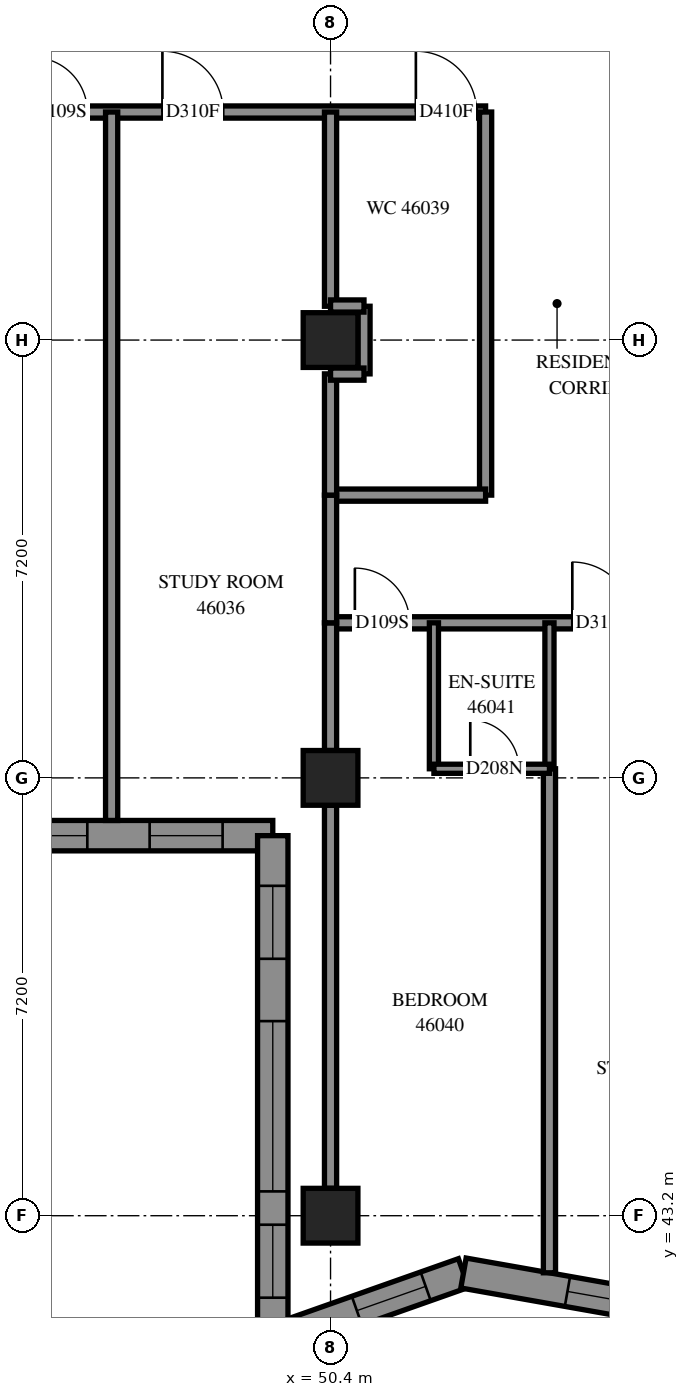
"""IFC4 building model, lengths in metres.
Left out: names, types, materials, properties, quantities, classifications, styles, units other than length and angle.
Written with IfcOpenShell. Run it as: python <this file> out.ifc"""

import sys

from ifc_helpers import new_model, si_unit, direction, frame, frame_2d, origin, origin_2d, place, context, subcontext, project, spatial, polyline, rectangle, outline, extrude, element, fill, save


model = new_model("IFC4")
c1 = context("Model", 3, precision=1e-05, world=origin(), true_north=direction((0.0, 1.0)))
c2 = subcontext(c1, "Body", "Model", "MODEL_VIEW")
j1 = project(units=[si_unit("LENGTHUNIT", "METRE"), si_unit("PLANEANGLEUNIT", "RADIAN")], contexts=[c1])
p1 = place(None, origin())
s1 = spatial("IfcSite", under=j1, at=p1, CompositionType="ELEMENT")
p2 = place(p1, origin())
s2 = spatial("IfcBuilding", under=s1, at=p2, CompositionType="ELEMENT")
p3 = place(p2, frame((0.0, 0.0, 169.4)))
s3 = spatial("IfcBuildingStorey", under=s2, at=p3, CompositionType="ELEMENT", Elevation=169.4)
for number, where, z_axis, x_axis in (
    (1, (50.4, 43.2, 0.0), (0.0, 0.0, 1.0), (1.0, 0.0, 0.0)),
    (2, (50.4, 50.4, 0.0), (0.0, 0.0, 1.0), (1.0, 0.0, 0.0)),
    (3, (50.4, 57.6, 0.0), (0.0, 0.0, 1.0), (1.0, 0.0, 0.0)),
):
    element("IfcColumn", number, at=place(p3, frame(where, z_axis=z_axis, x_axis=x_axis)), inside=s3, PredefinedType="COLUMN", context=c2, shape_type="SweptSolid", body=[
        extrude(rectangle(XDim=0.9, YDim=0.9, at=origin_2d()), origin(), (0.0, 0.0, 1.0), 3.1),
    ])
p4 = place(p3, frame((42.25, 49.45, 0.0), z_axis=(0.0, 0.0, 1.0), x_axis=(1.0, 0.0, 0.0)))
e4 = element("IfcWall", 4, at=p4, inside=s3, PredefinedType="SOLIDWALL", context=c2, shape_type="SweptSolid", body=[
    extrude(outline(polyline([(-0.25, -0.25), (6.95, -0.25), (7.45, 0.25), (0.25, 0.25), (-0.25, -0.25)])), origin(), (0.0, 0.0, 1.0), 3.1),
])
p5 = place(p4, frame((1.35, 0.0, 0.45)))
e5 = element("IfcOpeningElement", 5, at=p5, cuts=e4, PredefinedType="OPENING", context=c2, shape_type="SweptSolid", body=[
    extrude(rectangle(XDim=2.8, YDim=2.5, at=frame_2d((1.4, 1.25))), frame((0.0, 0.26, 0.0), z_axis=(0.0, -1.0, 0.0), x_axis=(1.0, 0.0, 0.0)), (0.0, 0.0, 1.0), 0.52),
])
p6 = place(p4, frame((5.175, 0.0, 0.45)))
e6 = element("IfcOpeningElement", 6, at=p6, cuts=e4, PredefinedType="OPENING", context=c2, shape_type="SweptSolid", body=[
    extrude(rectangle(XDim=1.2, YDim=2.5, at=frame_2d((0.6, 1.25))), frame((0.0, 0.26, 0.0), z_axis=(0.0, -1.0, 0.0), x_axis=(1.0, 0.0, 0.0)), (0.0, 0.0, 1.0), 0.52),
])
p7 = place(p3, frame((49.45, 49.45, 0.0), z_axis=(0.0, 0.0, 1.0), x_axis=(0.0, -1.0, 0.0)))
e7 = element("IfcWall", 7, at=p7, inside=s3, PredefinedType="SOLIDWALL", context=c2, shape_type="SweptSolid", body=[
    extrude(outline(polyline([(0.25, -0.25), (8.653, -0.25), (7.946, 0.25), (-0.25, 0.25), (0.25, -0.25)])), origin(), (0.0, 0.0, 1.0), 3.1),
])
p8 = place(p7, frame((3.05, 0.0, 0.45)))
e8 = element("IfcOpeningElement", 8, at=p8, cuts=e7, PredefinedType="OPENING", context=c2, shape_type="SweptSolid", body=[
    extrude(rectangle(XDim=2.8, YDim=2.5, at=frame_2d((1.4, 1.25))), frame((0.0, 0.26, 0.0), z_axis=(0.0, -1.0, 0.0), x_axis=(1.0, 0.0, 0.0)), (0.0, 0.0, 1.0), 0.52),
])
p9 = place(p7, frame((0.825, 0.0, 0.45)))
e9 = element("IfcOpeningElement", 9, at=p9, cuts=e7, PredefinedType="OPENING", context=c2, shape_type="SweptSolid", body=[
    extrude(rectangle(XDim=1.2, YDim=2.5, at=frame_2d((0.6, 1.25))), frame((0.0, 0.26, 0.0), z_axis=(0.0, -1.0, 0.0), x_axis=(1.0, 0.0, 0.0)), (0.0, 0.0, 1.0), 0.52),
])
p10 = place(p7, frame((6.398, 0.0, 0.45)))
e10 = element("IfcOpeningElement", 10, at=p10, cuts=e7, PredefinedType="OPENING", context=c2, shape_type="SweptSolid", body=[
    extrude(rectangle(XDim=1.2, YDim=2.5, at=frame_2d((0.6, 1.25))), frame((0.0, 0.26, 0.0), z_axis=(0.0, -1.0, 0.0), x_axis=(1.0, 0.0, 0.0)), (0.0, 0.0, 1.0), 0.52),
])
p11 = place(p3, frame((49.45, 41.15, 0.0), z_axis=(0.0, 0.0, 1.0), x_axis=(0.9429548009, 0.3329207766, 0.0)))
e11 = element("IfcWall", 11, at=p11, inside=s3, PredefinedType="SOLIDWALL", context=c2, shape_type="SweptSolid", body=[
    extrude(outline(polyline([(-0.353, -0.25), (3.26, -0.25), (3.392, 0.25), (0.353, 0.25), (-0.353, -0.25)])), origin(), (0.0, 0.0, 1.0), 3.1),
])
p12 = place(p11, frame((1.467, 0.0, 0.45)))
e12 = element("IfcOpeningElement", 12, at=p12, cuts=e11, PredefinedType="OPENING", context=c2, shape_type="SweptSolid", body=[
    extrude(rectangle(XDim=1.2, YDim=2.5, at=frame_2d((0.6, 1.25))), frame((0.0, 0.26, 0.0), z_axis=(0.0, -1.0, 0.0), x_axis=(1.0, 0.0, 0.0)), (0.0, 0.0, 1.0), 0.52),
])
p13 = place(p3, frame((52.586, 42.258, 0.0), z_axis=(0.0, 0.0, 1.0), x_axis=(0.9847004616, -0.1742555624, 0.0)))
e13 = element("IfcWall", 13, at=p13, inside=s3, PredefinedType="SOLIDWALL", context=c2, shape_type="SweptSolid", body=[
    extrude(outline(polyline([(0.066, -0.25), (3.526, -0.25), (3.437, 0.25), (-0.066, 0.25), (0.066, -0.25)])), origin(), (0.0, 0.0, 1.0), 3.1),
])
p14 = place(p13, frame((1.737, 0.0, 0.45)))
e14 = element("IfcOpeningElement", 14, at=p14, cuts=e13, PredefinedType="OPENING", context=c2, shape_type="SweptSolid", body=[
    extrude(rectangle(XDim=1.2, YDim=2.5, at=frame_2d((0.6, 1.25))), frame((0.0, 0.26, 0.0), z_axis=(0.0, -1.0, 0.0), x_axis=(1.0, 0.0, 0.0)), (0.0, 0.0, 1.0), 0.52),
])
p15 = place(p3, frame((36.0, 61.35, 0.0), z_axis=(0.0, 0.0, 1.0), x_axis=(1.0, 0.0, 0.0)))
e15 = element("IfcWall", 15, at=p15, inside=s3, PredefinedType="PARTITIONING", context=c2, shape_type="SweptSolid", body=[
    extrude(rectangle(XDim=16.95, YDim=0.2, at=frame_2d((8.475, 0.0))), origin(), (0.0, 0.0, 1.0), 3.1),
])
p16 = place(p15, frame((2.3, 0.0, 0.0)))
e16 = element("IfcOpeningElement", 16, at=p16, cuts=e15, PredefinedType="OPENING", context=c2, shape_type="SweptSolid", body=[
    extrude(rectangle(XDim=0.9, YDim=2.1, at=frame_2d((0.45, 1.05))), frame((0.0, 0.11, 0.0), z_axis=(0.0, -1.0, 0.0), x_axis=(1.0, 0.0, 0.0)), (0.0, 0.0, 1.0), 0.22),
])
p17 = place(p15, frame((4.125, 0.0, 0.0)))
e17 = element("IfcOpeningElement", 17, at=p17, cuts=e15, PredefinedType="OPENING", context=c2, shape_type="SweptSolid", body=[
    extrude(rectangle(XDim=1.0, YDim=2.1, at=frame_2d((0.5, 1.05))), frame((0.0, 0.11, 0.0), z_axis=(0.0, -1.0, 0.0), x_axis=(1.0, 0.0, 0.0)), (0.0, 0.0, 1.0), 0.22),
])
p18 = place(p15, frame((9.5, 0.0, 0.0)))
e18 = element("IfcOpeningElement", 18, at=p18, cuts=e15, PredefinedType="OPENING", context=c2, shape_type="SweptSolid", body=[
    extrude(rectangle(XDim=0.9, YDim=2.1, at=frame_2d((0.45, 1.05))), frame((0.0, 0.11, 0.0), z_axis=(0.0, -1.0, 0.0), x_axis=(1.0, 0.0, 0.0)), (0.0, 0.0, 1.0), 0.22),
])
p19 = place(p15, frame((11.635, 0.0, 0.0)))
e19 = element("IfcOpeningElement", 19, at=p19, cuts=e15, PredefinedType="OPENING", context=c2, shape_type="SweptSolid", body=[
    extrude(rectangle(XDim=1.0, YDim=2.1, at=frame_2d((0.5, 1.05))), frame((0.0, 0.11, 0.0), z_axis=(0.0, -1.0, 0.0), x_axis=(1.0, 0.0, 0.0)), (0.0, 0.0, 1.0), 0.22),
])
p20 = place(p15, frame((15.803, 0.0, 0.0)))
e20 = element("IfcOpeningElement", 20, at=p20, cuts=e15, PredefinedType="OPENING", context=c2, shape_type="SweptSolid", body=[
    extrude(rectangle(XDim=1.0, YDim=2.1, at=frame_2d((0.5, 1.05))), frame((0.0, 0.11, 0.0), z_axis=(0.0, -1.0, 0.0), x_axis=(1.0, 0.0, 0.0)), (0.0, 0.0, 1.0), 0.22),
])
p21 = place(p3, frame((46.8, 49.7, 0.0), z_axis=(0.0, 0.0, 1.0), x_axis=(0.0, 1.0, 0.0)))
e21 = element("IfcWall", 21, at=p21, inside=s3, PredefinedType="PARTITIONING", context=c2, shape_type="SweptSolid", body=[
    extrude(rectangle(XDim=11.65, YDim=0.2, at=frame_2d((5.825, 0.0))), origin(), (0.0, 0.0, 1.0), 3.1),
])
p22 = place(p3, frame((54.0, 42.261, 0.0), z_axis=(0.0, 0.0, 1.0), x_axis=(0.0, 1.0, 0.0)))
e22 = element("IfcWall", 22, at=p22, inside=s3, PredefinedType="PARTITIONING", context=c2, shape_type="SweptSolid", body=[
    extrude(rectangle(XDim=8.289, YDim=0.2, at=frame_2d((4.144, 0.0))), origin(), (0.0, 0.0, 1.0), 3.1),
])
p23 = place(p3, frame((50.4, 43.65, 0.0), z_axis=(0.0, 0.0, 1.0), x_axis=(0.0, 1.0, 0.0)))
e23 = element("IfcWall", 23, at=p23, inside=s3, PredefinedType="PARTITIONING", context=c2, shape_type="SweptSolid", body=[
    extrude(rectangle(XDim=6.3, YDim=0.2, at=frame_2d((3.15, 0.0))), origin(), (0.0, 0.0, 1.0), 2.6),
])
p24 = place(p3, frame((52.95, 55.05, 0.0), z_axis=(0.0, 0.0, 1.0), x_axis=(0.0, 1.0, 0.0)))
e24 = element("IfcWall", 24, at=p24, inside=s3, PredefinedType="PARTITIONING", context=c2, shape_type="SweptSolid", body=[
    extrude(rectangle(XDim=6.3, YDim=0.2, at=frame_2d((3.15, 0.0))), origin(), (0.0, 0.0, 1.0), 3.1),
])
p25 = place(p3, frame((50.4, 52.95, 0.0), z_axis=(0.0, 0.0, 1.0), x_axis=(1.0, 0.0, 0.0)))
e25 = element("IfcWall", 25, at=p25, inside=s3, PredefinedType="PARTITIONING", context=c2, shape_type="SweptSolid", body=[
    extrude(rectangle(XDim=5.1, YDim=0.2, at=frame_2d((2.55, 0.0))), origin(), (0.0, 0.0, 1.0), 3.1),
])
p26 = place(p25, frame((0.4, 0.0, 0.0)))
e26 = element("IfcOpeningElement", 26, at=p26, cuts=e25, PredefinedType="OPENING", context=c2, shape_type="SweptSolid", body=[
    extrude(rectangle(XDim=0.9, YDim=2.1, at=frame_2d((0.45, 1.05))), frame((0.0, 0.11, 0.0), z_axis=(0.0, -1.0, 0.0), x_axis=(1.0, 0.0, 0.0)), (0.0, 0.0, 1.0), 0.22),
])
p27 = place(p25, frame((3.976, 0.0, 0.0)))
e27 = element("IfcOpeningElement", 27, at=p27, cuts=e25, PredefinedType="OPENING", context=c2, shape_type="SweptSolid", body=[
    extrude(rectangle(XDim=1.0, YDim=2.1, at=frame_2d((0.5, 1.05))), frame((0.0, 0.11, 0.0), z_axis=(0.0, -1.0, 0.0), x_axis=(1.0, 0.0, 0.0)), (0.0, 0.0, 1.0), 0.22),
])
p28 = place(p3, frame((50.4, 58.156, 0.0), z_axis=(0.0, 0.0, 1.0), x_axis=(0.0, 1.0, 0.0)))
e28 = element("IfcWall", 28, at=p28, inside=s3, PredefinedType="PARTITIONING", context=c2, shape_type="SweptSolid", body=[
    extrude(rectangle(XDim=3.194, YDim=0.2, at=frame_2d((1.597, 0.0))), origin(), (0.0, 0.0, 1.0), 3.1),
])
p29 = place(p3, frame((50.4, 55.05, 0.0), z_axis=(0.0, 0.0, 1.0), x_axis=(1.0, 0.0, 0.0)))
e29 = element("IfcWall", 29, at=p29, inside=s3, PredefinedType="PARTITIONING", context=c2, shape_type="SweptSolid", body=[
    extrude(rectangle(XDim=2.55, YDim=0.2, at=frame_2d((1.275, 0.0))), origin(), (0.0, 0.0, 1.0), 3.1),
])
for number, where, z_axis, x_axis in (
    (30, (52.1, 50.55, 0.0), (0.0, 0.0, 1.0), (0.0, 1.0, 0.0)),
    (31, (54.0, 50.55, 0.0), (0.0, 0.0, 1.0), (0.0, 1.0, 0.0)),
):
    element("IfcWall", number, at=place(p3, frame(where, z_axis=z_axis, x_axis=x_axis)), inside=s3, PredefinedType="PARTITIONING", context=c2, shape_type="SweptSolid", body=[
        extrude(rectangle(XDim=2.4, YDim=0.15, at=frame_2d((1.2, 0.0))), origin(), (0.0, 0.0, 1.0), 3.1),
    ])
for number, where, z_axis, x_axis in (
    (32, (50.4, 50.85, 0.0), (0.0, 0.0, 1.0), (0.0, 1.0, 0.0)),
    (33, (50.4, 52.95, 0.0), (0.0, 0.0, 1.0), (0.0, 1.0, 0.0)),
):
    element("IfcWall", number, at=place(p3, frame(where, z_axis=z_axis, x_axis=x_axis)), inside=s3, PredefinedType="PARTITIONING", context=c2, shape_type="SweptSolid", body=[
        extrude(rectangle(XDim=2.1, YDim=0.2, at=frame_2d((1.05, 0.0))), origin(), (0.0, 0.0, 1.0), 3.1),
    ])
p30 = place(p3, frame((50.4, 55.05, 0.0), z_axis=(0.0, 0.0, 1.0), x_axis=(0.0, 1.0, 0.0)))
e34 = element("IfcWall", 34, at=p30, inside=s3, PredefinedType="PARTITIONING", context=c2, shape_type="SweptSolid", body=[
    extrude(rectangle(XDim=1.994, YDim=0.2, at=frame_2d((0.997, 0.0))), origin(), (0.0, 0.0, 1.0), 3.1),
])
p31 = place(p3, frame((52.1, 50.55, 0.0), z_axis=(0.0, 0.0, 1.0), x_axis=(1.0, 0.0, 0.0)))
e35 = element("IfcWall", 35, at=p31, inside=s3, PredefinedType="PARTITIONING", context=c2, shape_type="SweptSolid", body=[
    extrude(rectangle(XDim=1.9, YDim=0.15, at=frame_2d((0.95, 0.0))), origin(), (0.0, 0.0, 1.0), 3.1),
])
p32 = place(p31, frame((0.598, 0.0, 0.0)))
e36 = element("IfcOpeningElement", 36, at=p32, cuts=e35, PredefinedType="OPENING", context=c2, shape_type="SweptSolid", body=[
    extrude(rectangle(XDim=0.8, YDim=2.1, at=frame_2d((0.4, 1.05))), frame((0.0, 0.085, 0.0), z_axis=(0.0, -1.0, 0.0), x_axis=(1.0, 0.0, 0.0)), (0.0, 0.0, 1.0), 0.17),
])
p33 = place(p3, frame((50.95, 57.044, 0.0), z_axis=(0.0, 0.0, 1.0), x_axis=(0.0, 1.0, 0.0)))
e37 = element("IfcWall", 37, at=p33, inside=s3, PredefinedType="PARTITIONING", context=c2, shape_type="SweptSolid", body=[
    extrude(rectangle(XDim=1.112, YDim=0.2, at=frame_2d((0.556, 0.0))), origin(), (0.0, 0.0, 1.0), 3.1),
])
for number, where, z_axis, x_axis in (
    (38, (50.4, 58.16, 0.0), (0.0, 0.0, 1.0), (1.0, 0.0, 0.0)),
    (39, (50.4, 57.04, 0.0), (0.0, 0.0, 1.0), (1.0, 0.0, 0.0)),
):
    element("IfcWall", number, at=place(p3, frame(where, z_axis=z_axis, x_axis=x_axis)), inside=s3, PredefinedType="PARTITIONING", context=c2, shape_type="SweptSolid", body=[
        extrude(rectangle(XDim=0.55, YDim=0.2, at=frame_2d((0.275, 0.0))), origin(), (0.0, 0.0, 1.0), 3.1),
    ])
p34 = place(p5, origin())
e40 = element("IfcWindow", 40, at=p34, inside=s3, PartitioningType="SINGLE_PANEL", PredefinedType="WINDOW", context=c2, shape_type="SweptSolid", body=[
    extrude(rectangle(XDim=2.8, YDim=2.5, at=frame_2d((1.4, 1.25))), frame((0.0, 0.18, 0.0), z_axis=(0.0, -1.0, 0.0), x_axis=(1.0, 0.0, 0.0)), (0.0, 0.0, 1.0), 0.06),
])
fill(e5, e40)
p35 = place(p6, origin())
e41 = element("IfcWindow", 41, at=p35, inside=s3, PartitioningType="SINGLE_PANEL", PredefinedType="WINDOW", context=c2, shape_type="SweptSolid", body=[
    extrude(rectangle(XDim=1.2, YDim=2.5, at=frame_2d((0.6, 1.25))), frame((0.0, 0.18, 0.0), z_axis=(0.0, -1.0, 0.0), x_axis=(1.0, 0.0, 0.0)), (0.0, 0.0, 1.0), 0.06),
])
fill(e6, e41)
p36 = place(p8, origin())
e42 = element("IfcWindow", 42, at=p36, inside=s3, PartitioningType="SINGLE_PANEL", PredefinedType="WINDOW", context=c2, shape_type="SweptSolid", body=[
    extrude(rectangle(XDim=2.8, YDim=2.5, at=frame_2d((1.4, 1.25))), frame((0.0, 0.18, 0.0), z_axis=(0.0, -1.0, 0.0), x_axis=(1.0, 0.0, 0.0)), (0.0, 0.0, 1.0), 0.06),
])
fill(e8, e42)
p37 = place(p9, origin())
e43 = element("IfcWindow", 43, at=p37, inside=s3, PartitioningType="SINGLE_PANEL", PredefinedType="WINDOW", context=c2, shape_type="SweptSolid", body=[
    extrude(rectangle(XDim=1.2, YDim=2.5, at=frame_2d((0.6, 1.25))), frame((0.0, 0.18, 0.0), z_axis=(0.0, -1.0, 0.0), x_axis=(1.0, 0.0, 0.0)), (0.0, 0.0, 1.0), 0.06),
])
fill(e9, e43)
p38 = place(p10, origin())
e44 = element("IfcWindow", 44, at=p38, inside=s3, PartitioningType="SINGLE_PANEL", PredefinedType="WINDOW", context=c2, shape_type="SweptSolid", body=[
    extrude(rectangle(XDim=1.2, YDim=2.5, at=frame_2d((0.6, 1.25))), frame((0.0, 0.18, 0.0), z_axis=(0.0, -1.0, 0.0), x_axis=(1.0, 0.0, 0.0)), (0.0, 0.0, 1.0), 0.06),
])
fill(e10, e44)
p39 = place(p12, origin())
e45 = element("IfcWindow", 45, at=p39, inside=s3, PartitioningType="SINGLE_PANEL", PredefinedType="WINDOW", context=c2, shape_type="SweptSolid", body=[
    extrude(rectangle(XDim=1.2, YDim=2.5, at=frame_2d((0.6, 1.25))), frame((0.0, 0.18, 0.0), z_axis=(0.0, -1.0, 0.0), x_axis=(1.0, 0.0, 0.0)), (0.0, 0.0, 1.0), 0.06),
])
fill(e12, e45)
p40 = place(p14, origin())
e46 = element("IfcWindow", 46, at=p40, inside=s3, PartitioningType="SINGLE_PANEL", PredefinedType="WINDOW", context=c2, shape_type="SweptSolid", body=[
    extrude(rectangle(XDim=1.2, YDim=2.5, at=frame_2d((0.6, 1.25))), frame((0.0, 0.18, 0.0), z_axis=(0.0, -1.0, 0.0), x_axis=(1.0, 0.0, 0.0)), (0.0, 0.0, 1.0), 0.06),
])
fill(e14, e46)
p41 = place(p18, origin())
e47 = element("IfcDoor", 47, at=p41, inside=s3, OperationType="SINGLE_SWING_LEFT", PredefinedType="DOOR", context=c2, shape_type="SweptSolid", body=[
    extrude(rectangle(XDim=0.9, YDim=2.1, at=frame_2d((0.45, 1.05))), frame((0.0, 0.025, 0.0), z_axis=(0.0, -1.0, 0.0), x_axis=(1.0, 0.0, 0.0)), (0.0, 0.0, 1.0), 0.05),
])
fill(e18, e47)
p42 = place(p19, origin())
e48 = element("IfcDoor", 48, at=p42, inside=s3, OperationType="SINGLE_SWING_RIGHT", PredefinedType="DOOR", context=c2, shape_type="SweptSolid", body=[
    extrude(rectangle(XDim=1.0, YDim=2.1, at=frame_2d((0.5, 1.05))), frame((0.0, 0.025, 0.0), z_axis=(0.0, -1.0, 0.0), x_axis=(1.0, 0.0, 0.0)), (0.0, 0.0, 1.0), 0.05),
])
fill(e19, e48)
p43 = place(p20, origin())
e49 = element("IfcDoor", 49, at=p43, inside=s3, OperationType="SINGLE_SWING_LEFT", PredefinedType="DOOR", context=c2, shape_type="SweptSolid", body=[
    extrude(rectangle(XDim=1.0, YDim=2.1, at=frame_2d((0.5, 1.05))), frame((0.0, 0.025, 0.0), z_axis=(0.0, -1.0, 0.0), x_axis=(1.0, 0.0, 0.0)), (0.0, 0.0, 1.0), 0.05),
])
fill(e20, e49)
p44 = place(p26, origin())
e50 = element("IfcDoor", 50, at=p44, inside=s3, OperationType="SINGLE_SWING_LEFT", PredefinedType="DOOR", context=c2, shape_type="SweptSolid", body=[
    extrude(rectangle(XDim=0.9, YDim=2.1, at=frame_2d((0.45, 1.05))), frame((0.0, 0.025, 0.0), z_axis=(0.0, -1.0, 0.0), x_axis=(1.0, 0.0, 0.0)), (0.0, 0.0, 1.0), 0.05),
])
fill(e26, e50)
p45 = place(p32, origin())
e51 = element("IfcDoor", 51, at=p45, inside=s3, OperationType="SINGLE_SWING_RIGHT", PredefinedType="DOOR", context=c2, shape_type="SweptSolid", body=[
    extrude(rectangle(XDim=0.8, YDim=2.1, at=frame_2d((0.4, 1.05))), frame((0.0, 0.025, 0.0), z_axis=(0.0, -1.0, 0.0), x_axis=(1.0, 0.0, 0.0)), (0.0, 0.0, 1.0), 0.05),
])
fill(e36, e51)
p46 = place(p27, origin())
e52 = element("IfcDoor", 52, at=p46, inside=s3, OperationType="SINGLE_SWING_RIGHT", PredefinedType="DOOR", context=c2, shape_type="SweptSolid", body=[
    extrude(rectangle(XDim=1.0, YDim=2.1, at=frame_2d((0.5, 1.05))), frame((0.0, 0.025, 0.0), z_axis=(0.0, -1.0, 0.0), x_axis=(1.0, 0.0, 0.0)), (0.0, 0.0, 1.0), 0.05),
])
fill(e27, e52)
save(model, sys.argv[1])
